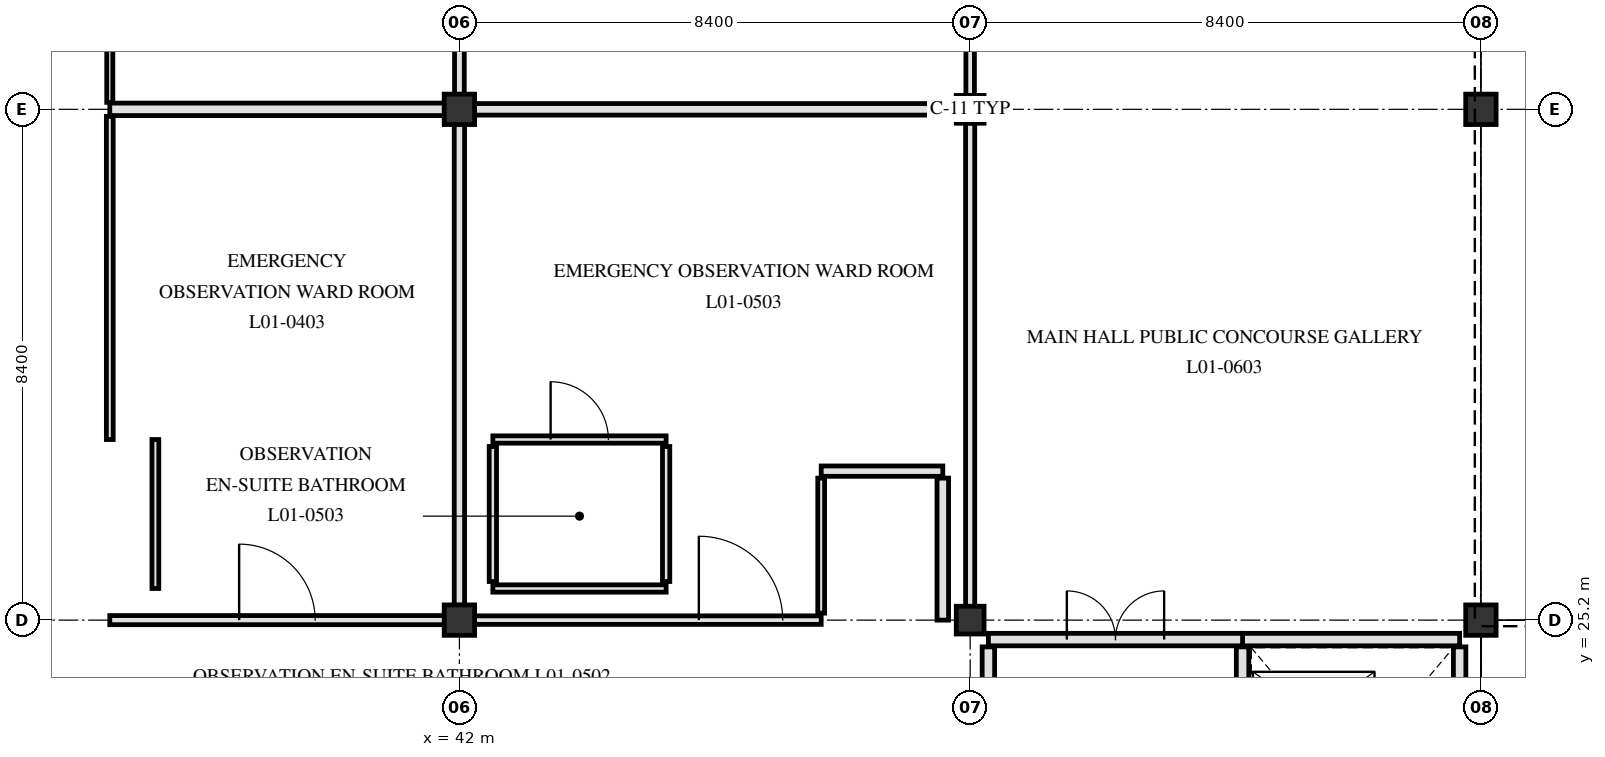
"""IFC4 building model, lengths in metres.
Left out: names, types, materials, properties, quantities, classifications, styles, units other than length and angle.
Written with IfcOpenShell. Run it as: python <this file> out.ifc"""

import sys

from ifc_helpers import new_model, si_unit, direction, frame, frame_2d, origin, origin_2d, place, context, subcontext, project, spatial, rectangle, hollow_circle, extrude, element, fill, save


model = new_model("IFC4")
c1 = context("Model", 3, precision=1e-05, world=origin(), true_north=direction((0.0, 1.0)))
c2 = subcontext(c1, "Body", "Model", "MODEL_VIEW")
j1 = project(units=[si_unit("LENGTHUNIT", "METRE"), si_unit("PLANEANGLEUNIT", "RADIAN")], contexts=[c1])
p1 = place(None, origin())
s1 = spatial("IfcSite", under=j1, at=p1, CompositionType="ELEMENT")
p2 = place(p1, origin())
s2 = spatial("IfcBuilding", under=s1, at=p2, CompositionType="ELEMENT")
p3 = place(p2, frame((0.0, 0.0, 4.8)))
s3 = spatial("IfcBuildingStorey", under=s2, at=p3, CompositionType="ELEMENT", Elevation=4.8)
for number, where, z_axis, x_axis in (
    (1, (42.0, 25.2, 0.0), (0.0, 0.0, 1.0), (1.0, 0.0, 0.0)),
    (2, (42.0, 33.6, 0.0), (0.0, 0.0, 1.0), (1.0, 0.0, 0.0)),
):
    element("IfcColumn", number, at=place(p3, frame(where, z_axis=z_axis, x_axis=x_axis)), inside=s3, PredefinedType="COLUMN", context=c2, shape_type="SweptSolid", body=[
        extrude(rectangle(XDim=0.5, YDim=0.5, at=origin_2d()), origin(), (0.0, 0.0, 1.0), 4.5),
    ])
for number, where, z_axis, x_axis in (
    (3, (50.4, 25.2, 0.0), (0.0, 0.0, 1.0), (1.0, 0.0, 0.0)),
    (4, (50.4, 33.6, 0.0), (0.0, 0.0, 1.0), (1.0, 0.0, 0.0)),
):
    element("IfcColumn", number, at=place(p3, frame(where, z_axis=z_axis, x_axis=x_axis)), inside=s3, PredefinedType="COLUMN", context=c2, shape_type="SweptSolid", body=[
        extrude(hollow_circle(Radius=0.229, WallThickness=0.02, at=origin_2d()), origin(), (0.0, 0.0, 1.0), 4.5),
    ])
for number, where, z_axis, x_axis in (
    (5, (58.8, 25.2, 0.0), (0.0, 0.0, 1.0), (1.0, 0.0, 0.0)),
    (6, (58.8, 33.6, 0.0), (0.0, 0.0, 1.0), (1.0, 0.0, 0.0)),
):
    element("IfcColumn", number, at=place(p3, frame(where, z_axis=z_axis, x_axis=x_axis)), inside=s3, PredefinedType="COLUMN", context=c2, shape_type="SweptSolid", body=[
        extrude(rectangle(XDim=0.5, YDim=0.5, at=origin_2d()), origin(), (0.0, 0.0, 1.0), 4.5),
    ])
p4 = place(p3, frame((54.88, 20.64, 0.0), z_axis=(0.0, 0.0, 1.0), x_axis=(0.0, 1.0, 0.0)))
e7 = element("IfcWall", 7, at=p4, inside=s3, PredefinedType="PARTITIONING", context=c2, shape_type="SweptSolid", body=[
    extrude(rectangle(XDim=4.12, YDim=0.205, at=frame_2d((2.06, 0.0))), origin(), (0.0, 0.0, 1.0), 4.14),
])
p5 = place(p4, frame((0.445, 0.0, 0.0)))
e8 = element("IfcOpeningElement", 8, at=p5, cuts=e7, PredefinedType="OPENING", context=c2, shape_type="SweptSolid", body=[
    extrude(rectangle(XDim=1.35, YDim=2.2, at=frame_2d((0.675, 1.1))), frame((0.0, 0.113, 0.0), z_axis=(0.0, -1.0, 0.0), x_axis=(1.0, 0.0, 0.0)), (0.0, 0.0, 1.0), 0.225),
])
p6 = place(p4, frame((2.45, 0.0, 0.0)))
e9 = element("IfcOpeningElement", 9, at=p6, cuts=e7, PredefinedType="OPENING", context=c2, shape_type="SweptSolid", body=[
    extrude(rectangle(XDim=1.1, YDim=2.15, at=frame_2d((0.55, 1.075))), frame((0.0, 0.113, 0.0), z_axis=(0.0, -1.0, 0.0), x_axis=(1.0, 0.0, 0.0)), (0.0, 0.0, 1.0), 0.225),
])
p7 = place(p3, frame((58.45, 20.64, 0.0), z_axis=(0.0, 0.0, 1.0), x_axis=(0.0, 1.0, 0.0)))
e10 = element("IfcWall", 10, at=p7, inside=s3, PredefinedType="PARTITIONING", context=c2, shape_type="SweptSolid", body=[
    extrude(rectangle(XDim=4.12, YDim=0.205, at=frame_2d((2.06, 0.0))), origin(), (0.0, 0.0, 1.0), 4.14),
])
p8 = place(p3, frame((54.88, 24.88, 0.0), z_axis=(0.0, 0.0, 1.0), x_axis=(1.0, 0.0, 0.0)))
e11 = element("IfcWall", 11, at=p8, inside=s3, PredefinedType="PARTITIONING", context=c2, shape_type="SweptSolid", body=[
    extrude(rectangle(XDim=3.57, YDim=0.205, at=frame_2d((1.785, 0.0))), origin(), (0.0, 0.0, 1.0), 3.54),
])
p9 = place(p3, frame((50.7, 20.64, 0.0), z_axis=(0.0, 0.0, 1.0), x_axis=(0.0, 1.0, 0.0)))
e12 = element("IfcWall", 12, at=p9, inside=s3, PredefinedType="PARTITIONING", context=c2, shape_type="SweptSolid", body=[
    extrude(rectangle(XDim=4.12, YDim=0.205, at=frame_2d((2.06, 0.0))), origin(), (0.0, 0.0, 1.0), 4.14),
])
p10 = place(p3, frame((50.7, 24.88, 0.0), z_axis=(0.0, 0.0, 1.0), x_axis=(1.0, 0.0, 0.0)))
e13 = element("IfcWall", 13, at=p10, inside=s3, PredefinedType="PARTITIONING", context=c2, shape_type="SweptSolid", body=[
    extrude(rectangle(XDim=4.18, YDim=0.205, at=frame_2d((2.09, 0.0))), origin(), (0.0, 0.0, 1.0), 3.54),
])
p11 = place(p10, frame((1.29, 0.0, 0.0)))
e14 = element("IfcOpeningElement", 14, at=p11, cuts=e13, PredefinedType="OPENING", context=c2, shape_type="SweptSolid", body=[
    extrude(rectangle(XDim=1.6, YDim=2.25, at=frame_2d((0.8, 1.125))), frame((0.0, 0.113, 0.0), z_axis=(0.0, -1.0, 0.0), x_axis=(1.0, 0.0, 0.0)), (0.0, 0.0, 1.0), 0.225),
])
p12 = place(p3, frame((36.25, 25.2, 0.0), z_axis=(0.0, 0.0, 1.0), x_axis=(1.0, 0.0, 0.0)))
e15 = element("IfcWall", 15, at=p12, inside=s3, PredefinedType="PARTITIONING", context=c2, shape_type="SweptSolid", body=[
    extrude(rectangle(XDim=5.505, YDim=0.15, at=frame_2d((2.752, 0.0))), origin(), (0.0, 0.0, 1.0), 3.54),
])
p13 = place(p12, frame((2.127, 0.0, 0.0)))
e16 = element("IfcOpeningElement", 16, at=p13, cuts=e15, PredefinedType="OPENING", context=c2, shape_type="SweptSolid", body=[
    extrude(rectangle(XDim=1.25, YDim=2.2, at=frame_2d((0.625, 1.1))), frame((0.0, 0.085, 0.0), z_axis=(0.0, -1.0, 0.0), x_axis=(1.0, 0.0, 0.0)), (0.0, 0.0, 1.0), 0.17),
])
p14 = place(p3, frame((42.245, 25.2, 0.0), z_axis=(0.0, 0.0, 1.0), x_axis=(1.0, 0.0, 0.0)))
e17 = element("IfcWall", 17, at=p14, inside=s3, PredefinedType="PARTITIONING", context=c2, shape_type="SweptSolid", body=[
    extrude(rectangle(XDim=5.705, YDim=0.14, at=frame_2d((2.853, 0.0))), origin(), (0.0, 0.0, 1.0), 3.54),
])
p15 = place(p14, frame((3.693, 0.0, 0.0)))
e18 = element("IfcOpeningElement", 18, at=p15, cuts=e17, PredefinedType="OPENING", context=c2, shape_type="SweptSolid", body=[
    extrude(rectangle(XDim=1.38, YDim=2.22, at=frame_2d((0.69, 1.11))), frame((0.0, 0.08, 0.0), z_axis=(0.0, -1.0, 0.0), x_axis=(1.0, 0.0, 0.0)), (0.0, 0.0, 1.0), 0.16),
])
p16 = place(p3, frame((42.55, 25.72, 0.0), z_axis=(0.0, 0.0, 1.0), x_axis=(1.0, 0.0, 0.0)))
e19 = element("IfcWall", 19, at=p16, inside=s3, PredefinedType="PARTITIONING", context=c2, shape_type="SweptSolid", body=[
    extrude(rectangle(XDim=2.85, YDim=0.12, at=frame_2d((1.425, 0.0))), origin(), (0.0, 0.0, 1.0), 4.14),
])
p17 = place(p3, frame((47.95, 27.65, 0.0), z_axis=(0.0, 0.0, 1.0), x_axis=(1.0, 0.0, 0.0)))
e20 = element("IfcWall", 20, at=p17, inside=s3, PredefinedType="PARTITIONING", context=c2, shape_type="SweptSolid", body=[
    extrude(rectangle(XDim=2.0, YDim=0.17, at=frame_2d((1.0, 0.0))), origin(), (0.0, 0.0, 1.0), 4.14),
])
p18 = place(p3, frame((42.55, 28.17, 0.0), z_axis=(0.0, 0.0, 1.0), x_axis=(1.0, 0.0, 0.0)))
e21 = element("IfcWall", 21, at=p18, inside=s3, PredefinedType="PARTITIONING", context=c2, shape_type="SweptSolid", body=[
    extrude(rectangle(XDim=2.85, YDim=0.12, at=frame_2d((1.425, 0.0))), origin(), (0.0, 0.0, 1.0), 4.14),
])
p19 = place(p18, frame((0.95, 0.0, 0.0)))
e22 = element("IfcOpeningElement", 22, at=p19, cuts=e21, PredefinedType="OPENING", context=c2, shape_type="SweptSolid", body=[
    extrude(rectangle(XDim=0.95, YDim=2.1, at=frame_2d((0.475, 1.05))), frame((0.0, 0.07, 0.0), z_axis=(0.0, -1.0, 0.0), x_axis=(1.0, 0.0, 0.0)), (0.0, 0.0, 1.0), 0.14),
])
p20 = place(p3, frame((36.25, 33.6, 0.0), z_axis=(0.0, 0.0, 1.0), x_axis=(1.0, 0.0, 0.0)))
e23 = element("IfcWall", 23, at=p20, inside=s3, PredefinedType="PARTITIONING", context=c2, shape_type="SweptSolid", body=[
    extrude(rectangle(XDim=5.505, YDim=0.205, at=frame_2d((2.752, 0.0))), origin(), (0.0, 0.0, 1.0), 3.54),
])
p21 = place(p3, frame((42.245, 33.6, 0.0), z_axis=(0.0, 0.0, 1.0), x_axis=(1.0, 0.0, 0.0)))
e24 = element("IfcWall", 24, at=p21, inside=s3, PredefinedType="PARTITIONING", context=c2, shape_type="SweptSolid", body=[
    extrude(rectangle(XDim=7.931, YDim=0.19, at=frame_2d((3.966, 0.0))), origin(), (0.0, 0.0, 1.0), 3.54),
])
p22 = place(p3, frame((36.25, 28.17, 0.0), z_axis=(0.0, 0.0, 1.0), x_axis=(0.0, 1.0, 0.0)))
e25 = element("IfcWall", 25, at=p22, inside=s3, PredefinedType="PARTITIONING", context=c2, shape_type="SweptSolid", body=[
    extrude(rectangle(XDim=5.315, YDim=0.112, at=frame_2d((2.658, 0.0))), origin(), (0.0, 0.0, 1.0), 3.54),
])
p23 = place(p3, frame((36.25, 33.715, 0.0), z_axis=(0.0, 0.0, 1.0), x_axis=(0.0, 1.0, 0.0)))
e26 = element("IfcWall", 26, at=p23, inside=s3, PredefinedType="PARTITIONING", context=c2, shape_type="SweptSolid", body=[
    extrude(rectangle(XDim=5.315, YDim=0.1, at=frame_2d((2.657, 0.0))), origin(), (0.0, 0.0, 1.0), 3.54),
])
p24 = place(p3, frame((37.0, 25.72, 0.0), z_axis=(0.0, 0.0, 1.0), x_axis=(0.0, 1.0, 0.0)))
e27 = element("IfcWall", 27, at=p24, inside=s3, PredefinedType="PARTITIONING", context=c2, shape_type="SweptSolid", body=[
    extrude(rectangle(XDim=2.45, YDim=0.112, at=frame_2d((1.225, 0.0))), origin(), (0.0, 0.0, 1.0), 4.14),
])
p25 = place(p3, frame((42.0, 25.445, 0.0), z_axis=(0.0, 0.0, 1.0), x_axis=(0.0, 1.0, 0.0)))
e28 = element("IfcWall", 28, at=p25, inside=s3, PredefinedType="PARTITIONING", context=c2, shape_type="SweptSolid", body=[
    extrude(rectangle(XDim=7.91, YDim=0.17, at=frame_2d((3.955, 0.0))), origin(), (0.0, 0.0, 1.0), 3.59),
])
p26 = place(p3, frame((42.0, 33.845, 0.0), z_axis=(0.0, 0.0, 1.0), x_axis=(0.0, 1.0, 0.0)))
e29 = element("IfcWall", 29, at=p26, inside=s3, PredefinedType="PARTITIONING", context=c2, shape_type="SweptSolid", body=[
    extrude(rectangle(XDim=7.91, YDim=0.16, at=frame_2d((3.955, 0.0))), origin(), (0.0, 0.0, 1.0), 3.59),
])
for number, where, z_axis, x_axis in (
    (30, (42.55, 25.835, 0.0), (0.0, 0.0, 1.0), (0.0, 1.0, 0.0)),
    (31, (45.4, 25.835, 0.0), (0.0, 0.0, 1.0), (0.0, 1.0, 0.0)),
):
    element("IfcWall", number, at=place(p3, frame(where, z_axis=z_axis, x_axis=x_axis)), inside=s3, PredefinedType="PARTITIONING", context=c2, shape_type="SweptSolid", body=[
        extrude(rectangle(XDim=2.22, YDim=0.12, at=frame_2d((1.11, 0.0))), origin(), (0.0, 0.0, 1.0), 4.14),
    ])
p27 = place(p3, frame((47.95, 25.315, 0.0), z_axis=(0.0, 0.0, 1.0), x_axis=(0.0, 1.0, 0.0)))
e32 = element("IfcWall", 32, at=p27, inside=s3, PredefinedType="PARTITIONING", context=c2, shape_type="SweptSolid", body=[
    extrude(rectangle(XDim=2.22, YDim=0.112, at=frame_2d((1.11, 0.0))), origin(), (0.0, 0.0, 1.0), 3.54),
])
p28 = place(p3, frame((49.95, 25.2, 0.0), z_axis=(0.0, 0.0, 1.0), x_axis=(0.0, 1.0, 0.0)))
e33 = element("IfcWall", 33, at=p28, inside=s3, PredefinedType="PARTITIONING", context=c2, shape_type="SweptSolid", body=[
    extrude(rectangle(XDim=2.335, YDim=0.19, at=frame_2d((1.167, 0.0))), origin(), (0.0, 0.0, 1.0), 3.54),
])
p29 = place(p3, frame((50.4, 25.424, 0.0), z_axis=(0.0, 0.0, 1.0), x_axis=(0.0, 1.0, 0.0)))
e34 = element("IfcWall", 34, at=p29, inside=s3, PredefinedType="PARTITIONING", context=c2, shape_type="SweptSolid", body=[
    extrude(rectangle(XDim=7.953, YDim=0.15, at=frame_2d((3.977, 0.0))), origin(), (0.0, 0.0, 1.0), 3.74),
])
p30 = place(p3, frame((50.4, 33.823, 0.0), z_axis=(0.0, 0.0, 1.0), x_axis=(0.0, 1.0, 0.0)))
e35 = element("IfcWall", 35, at=p30, inside=s3, PredefinedType="PARTITIONING", context=c2, shape_type="SweptSolid", body=[
    extrude(rectangle(XDim=7.953, YDim=0.14, at=frame_2d((3.977, 0.0))), origin(), (0.0, 0.0, 1.0), 3.74),
])
p31 = place(p11, origin())
e36 = element("IfcDoor", 36, at=p31, inside=s3, OperationType="DOUBLE_SWING_LEFT", PredefinedType="DOOR", context=c2, shape_type="SweptSolid", body=[
    extrude(rectangle(XDim=1.6, YDim=2.25, at=frame_2d((0.8, 1.125))), frame((0.0, 0.025, 0.0), z_axis=(0.0, -1.0, 0.0), x_axis=(1.0, 0.0, 0.0)), (0.0, 0.0, 1.0), 0.05),
])
fill(e14, e36)
p32 = place(p13, origin())
e37 = element("IfcDoor", 37, at=p32, inside=s3, OperationType="SINGLE_SWING_LEFT", PredefinedType="DOOR", context=c2, shape_type="SweptSolid", body=[
    extrude(rectangle(XDim=1.25, YDim=2.2, at=frame_2d((0.625, 1.1))), frame((0.0, 0.025, 0.0), z_axis=(0.0, -1.0, 0.0), x_axis=(1.0, 0.0, 0.0)), (0.0, 0.0, 1.0), 0.05),
])
fill(e16, e37)
p33 = place(p15, origin())
e38 = element("IfcDoor", 38, at=p33, inside=s3, OperationType="SINGLE_SWING_LEFT", PredefinedType="DOOR", context=c2, shape_type="SweptSolid", body=[
    extrude(rectangle(XDim=1.38, YDim=2.22, at=frame_2d((0.69, 1.11))), frame((0.0, 0.025, 0.0), z_axis=(0.0, -1.0, 0.0), x_axis=(1.0, 0.0, 0.0)), (0.0, 0.0, 1.0), 0.05),
])
fill(e18, e38)
p34 = place(p19, origin())
e39 = element("IfcDoor", 39, at=p34, inside=s3, OperationType="SINGLE_SWING_LEFT", PredefinedType="DOOR", context=c2, shape_type="SweptSolid", body=[
    extrude(rectangle(XDim=0.95, YDim=2.1, at=frame_2d((0.475, 1.05))), frame((0.0, 0.025, 0.0), z_axis=(0.0, -1.0, 0.0), x_axis=(1.0, 0.0, 0.0)), (0.0, 0.0, 1.0), 0.05),
])
fill(e22, e39)
save(model, sys.argv[1])
